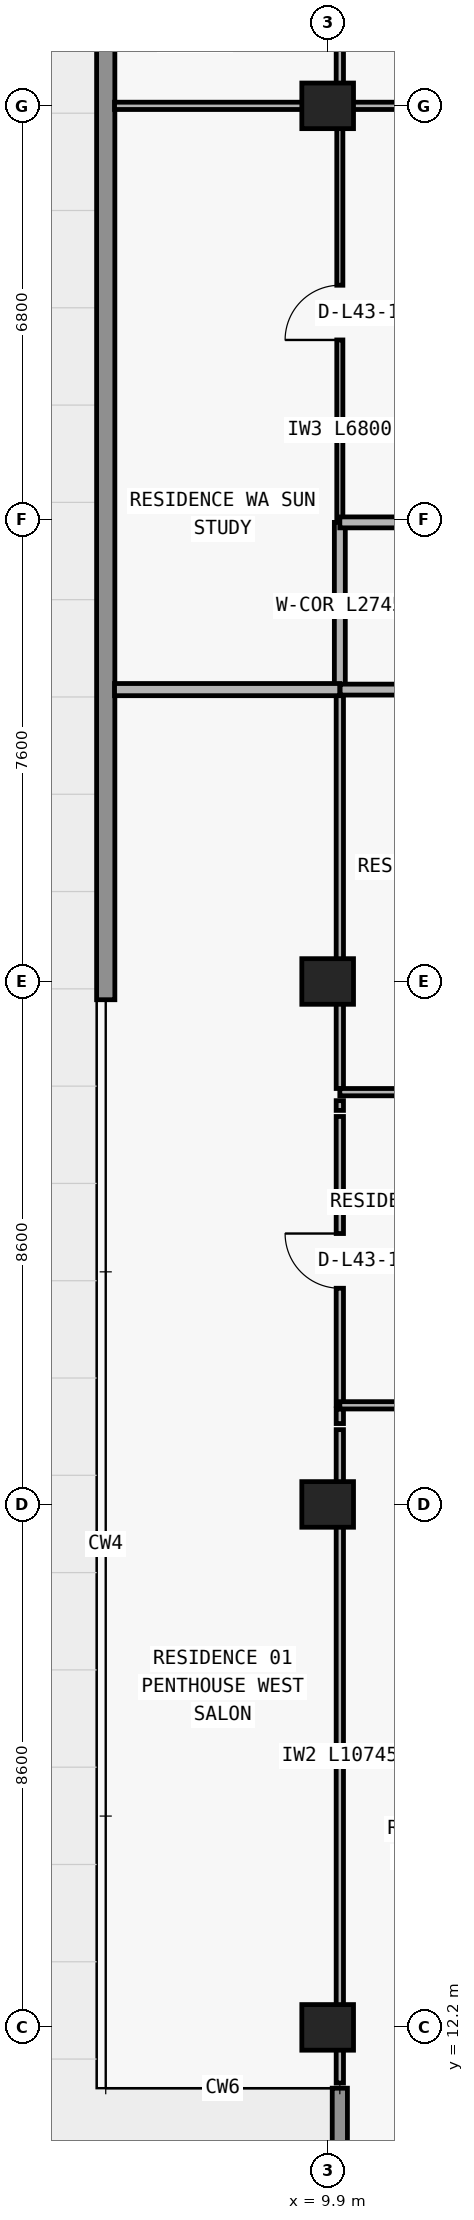
"""IFC4 building model, lengths in metres.
Left out: names, types, materials, properties, quantities, classifications, styles, units other than length and angle.
Written with IfcOpenShell. Run it as: python <this file> out.ifc"""

import sys

from ifc_helpers import new_model, si_unit, direction, frame, frame_2d, origin, origin_2d, place, context, subcontext, project, spatial, rectangle, extrude, element, fill, save


model = new_model("IFC4")
c1 = context("Model", 3, precision=1e-05, world=origin(), true_north=direction((0.0, 1.0)))
c2 = subcontext(c1, "Body", "Model", "MODEL_VIEW")
j1 = project(units=[si_unit("LENGTHUNIT", "METRE"), si_unit("PLANEANGLEUNIT", "RADIAN")], contexts=[c1])
p1 = place(None, origin())
s1 = spatial("IfcSite", under=j1, at=p1, CompositionType="ELEMENT")
p2 = place(p1, origin())
s2 = spatial("IfcBuilding", under=s1, at=p2, CompositionType="ELEMENT")
p3 = place(p2, frame((0.0, 0.0, 157.2)))
s3 = spatial("IfcBuildingStorey", under=s2, at=p3, CompositionType="ELEMENT", Elevation=157.2)
for number, where, z_axis, x_axis in (
    (1, (9.9, 12.2, 0.0), (0.0, 0.0, 1.0), (1.0, 0.0, 0.0)),
    (2, (9.9, 20.8, 0.0), (0.0, 0.0, 1.0), (1.0, 0.0, 0.0)),
    (3, (9.9, 29.4, 0.0), (0.0, 0.0, 1.0), (1.0, 0.0, 0.0)),
    (4, (9.9, 43.8, 0.0), (0.0, 0.0, 1.0), (1.0, 0.0, 0.0)),
):
    element("IfcColumn", number, at=place(p3, frame(where, z_axis=z_axis, x_axis=x_axis)), inside=s3, PredefinedType="COLUMN", context=c2, shape_type="SweptSolid", body=[
        extrude(rectangle(XDim=0.85, YDim=0.75, at=origin_2d()), origin(), (0.0, 0.0, 1.0), 3.05),
    ])
p4 = place(p3, frame((10.1, 11.2, 0.0), z_axis=(0.0, 0.0, 1.0), x_axis=(0.0, -1.0, 0.0)))
e5 = element("IfcWall", 5, at=p4, inside=s3, PredefinedType="ELEMENTEDWALL", context=c2, shape_type="SweptSolid", body=[
    extrude(rectangle(XDim=3.45, YDim=0.25, at=frame_2d((1.725, 0.0))), origin(), (0.0, 0.0, 1.0), 3.05),
])
p5 = place(p3, frame((6.25, 29.1, 0.0), z_axis=(0.0, 0.0, 1.0), x_axis=(0.0, 1.0, 0.0)))
e6 = element("IfcWall", 6, at=p5, inside=s3, PredefinedType="STANDARD", context=c2, shape_type="SweptSolid", body=[
    extrude(rectangle(XDim=17.9, YDim=0.3, at=frame_2d((8.95, 0.0))), origin(), (0.0, 0.0, 1.0), 3.05),
])
p6 = place(p3, frame((10.1, 11.285, 0.0), z_axis=(0.0, 0.0, 1.0), x_axis=(0.0, 1.0, 0.0)))
e7 = element("IfcWall", 7, at=p6, inside=s3, PredefinedType="PARTITIONING", context=c2, shape_type="SweptSolid", body=[
    extrude(rectangle(XDim=10.745, YDim=0.12, at=frame_2d((5.373, 0.0))), origin(), (0.0, 0.0, 1.0), 2.263),
])
p7 = place(p3, frame((10.1, 22.13, 0.0), z_axis=(0.0, 0.0, 1.0), x_axis=(0.0, 1.0, 0.0)))
e8 = element("IfcWall", 8, at=p7, inside=s3, PredefinedType="PARTITIONING", context=c2, shape_type="SweptSolid", body=[
    extrude(rectangle(XDim=0.24, YDim=0.12, at=frame_2d((0.12, 0.0))), origin(), (0.0, 0.0, 1.0), 2.263),
])
p8 = place(p3, frame((10.1, 22.43, 0.0), z_axis=(0.0, 0.0, 1.0), x_axis=(0.0, 1.0, 0.0)))
e9 = element("IfcWall", 9, at=p8, inside=s3, PredefinedType="PARTITIONING", context=c2, shape_type="SweptSolid", body=[
    extrude(rectangle(XDim=4.75, YDim=0.12, at=frame_2d((2.375, 0.0))), origin(), (0.0, 0.0, 1.0), 2.263),
])
p9 = place(p8, frame((1.925, 0.0, 0.0)))
e10 = element("IfcOpeningElement", 10, at=p9, cuts=e9, PredefinedType="OPENING", context=c2, shape_type="SweptSolid", body=[
    extrude(rectangle(XDim=0.9, YDim=2.15, at=frame_2d((0.45, 1.075))), frame((0.0, 0.07, 0.0), z_axis=(0.0, -1.0, 0.0), x_axis=(1.0, 0.0, 0.0)), (0.0, 0.0, 1.0), 0.14),
])
p10 = place(p3, frame((10.1, 27.28, 0.0), z_axis=(0.0, 0.0, 1.0), x_axis=(0.0, 1.0, 0.0)))
e11 = element("IfcWall", 11, at=p10, inside=s3, PredefinedType="PARTITIONING", context=c2, shape_type="SweptSolid", body=[
    extrude(rectangle(XDim=0.16, YDim=0.12, at=frame_2d((0.08, 0.0))), origin(), (0.0, 0.0, 1.0), 2.263),
])
p11 = place(p3, frame((10.1, 27.64, 0.0), z_axis=(0.0, 0.0, 1.0), x_axis=(0.0, 1.0, 0.0)))
e12 = element("IfcWall", 12, at=p11, inside=s3, PredefinedType="PARTITIONING", context=c2, shape_type="SweptSolid", body=[
    extrude(rectangle(XDim=6.56, YDim=0.12, at=frame_2d((3.28, 0.0))), origin(), (0.0, 0.0, 1.0), 2.263),
])
p12 = place(p3, frame((10.1, 34.205, 0.0), z_axis=(0.0, 0.0, 1.0), x_axis=(0.0, 1.0, 0.0)))
e13 = element("IfcWall", 13, at=p12, inside=s3, PredefinedType="PARTITIONING", context=c2, shape_type="SweptSolid", body=[
    extrude(rectangle(XDim=2.745, YDim=0.18, at=frame_2d((1.373, 0.0))), origin(), (0.0, 0.0, 1.0), 2.263),
])
p13 = place(p3, frame((10.1, 37.0, 0.0), z_axis=(0.0, 0.0, 1.0), x_axis=(0.0, 1.0, 0.0)))
e14 = element("IfcWall", 14, at=p13, inside=s3, PredefinedType="MOVABLE", context=c2, shape_type="SweptSolid", body=[
    extrude(rectangle(XDim=6.8, YDim=0.1, at=frame_2d((3.4, 0.0))), origin(), (0.0, 0.0, 1.0), 2.263),
])
p14 = place(p13, frame((2.95, 0.0, 0.0)))
e15 = element("IfcOpeningElement", 15, at=p14, cuts=e14, PredefinedType="OPENING", context=c2, shape_type="SweptSolid", body=[
    extrude(rectangle(XDim=0.9, YDim=2.15, at=frame_2d((0.45, 1.075))), frame((0.0, 0.06, 0.0), z_axis=(0.0, -1.0, 0.0), x_axis=(1.0, 0.0, 0.0)), (0.0, 0.0, 1.0), 0.12),
])
p15 = place(p3, frame((10.1, 43.805, 0.0), z_axis=(0.0, 0.0, 1.0), x_axis=(0.0, 1.0, 0.0)))
e16 = element("IfcWall", 16, at=p15, inside=s3, PredefinedType="PARTITIONING", context=c2, shape_type="SweptSolid", body=[
    extrude(rectangle(XDim=3.075, YDim=0.12, at=frame_2d((1.538, 0.0))), origin(), (0.0, 0.0, 1.0), 3.05),
])
p16 = place(p15, frame((1.087, 0.0, 0.0)))
e17 = element("IfcOpeningElement", 17, at=p16, cuts=e16, PredefinedType="OPENING", context=c2, shape_type="SweptSolid", body=[
    extrude(rectangle(XDim=0.9, YDim=2.15, at=frame_2d((0.45, 1.075))), frame((0.0, 0.07, 0.0), z_axis=(0.0, -1.0, 0.0), x_axis=(1.0, 0.0, 0.0)), (0.0, 0.0, 1.0), 0.14),
])
p17 = place(p3, frame((10.1, 22.43, 0.0), z_axis=(0.0, 0.0, 1.0), x_axis=(1.0, 0.0, 0.0)))
e18 = element("IfcWall", 18, at=p17, inside=s3, PredefinedType="PARTITIONING", context=c2, shape_type="SweptSolid", body=[
    extrude(rectangle(XDim=8.15, YDim=0.12, at=frame_2d((4.075, 0.0))), origin(), (0.0, 0.0, 1.0), 3.05),
])
p18 = place(p17, frame((1.477, 0.0, 0.0)))
e19 = element("IfcOpeningElement", 19, at=p18, cuts=e18, PredefinedType="OPENING", context=c2, shape_type="SweptSolid", body=[
    extrude(rectangle(XDim=0.9, YDim=2.15, at=frame_2d((0.45, 1.075))), frame((0.0, 0.07, 0.0), z_axis=(0.0, -1.0, 0.0), x_axis=(1.0, 0.0, 0.0)), (0.0, 0.0, 1.0), 0.14),
])
p19 = place(p17, frame((5.839, 0.0, 0.0)))
e20 = element("IfcOpeningElement", 20, at=p19, cuts=e18, PredefinedType="OPENING", context=c2, shape_type="SweptSolid", body=[
    extrude(rectangle(XDim=0.9, YDim=2.15, at=frame_2d((0.45, 1.075))), frame((0.0, 0.07, 0.0), z_axis=(0.0, -1.0, 0.0), x_axis=(1.0, 0.0, 0.0)), (0.0, 0.0, 1.0), 0.14),
])
p20 = place(p3, frame((10.1, 27.58, 0.0), z_axis=(0.0, 0.0, 1.0), x_axis=(1.0, 0.0, 0.0)))
e21 = element("IfcWall", 21, at=p20, inside=s3, PredefinedType="PARTITIONING", context=c2, shape_type="SweptSolid", body=[
    extrude(rectangle(XDim=8.15, YDim=0.12, at=frame_2d((4.075, 0.0))), origin(), (0.0, 0.0, 1.0), 3.05),
])
p21 = place(p20, frame((1.764, 0.0, 0.0)))
e22 = element("IfcOpeningElement", 22, at=p21, cuts=e21, PredefinedType="OPENING", context=c2, shape_type="SweptSolid", body=[
    extrude(rectangle(XDim=0.9, YDim=2.15, at=frame_2d((0.45, 1.075))), frame((0.0, 0.07, 0.0), z_axis=(0.0, -1.0, 0.0), x_axis=(1.0, 0.0, 0.0)), (0.0, 0.0, 1.0), 0.14),
])
p22 = place(p3, frame((6.395, 34.2, 0.0), z_axis=(0.0, 0.0, 1.0), x_axis=(1.0, 0.0, 0.0)))
e23 = element("IfcWall", 23, at=p22, inside=s3, PredefinedType="PARTITIONING", context=c2, shape_type="SweptSolid", body=[
    extrude(rectangle(XDim=3.705, YDim=0.2, at=frame_2d((1.853, 0.0))), origin(), (0.0, 0.0, 1.0), 3.05),
])
p23 = place(p3, frame((10.105, 34.2, 0.0), z_axis=(0.0, 0.0, 1.0), x_axis=(1.0, 0.0, 0.0)))
e24 = element("IfcWall", 24, at=p23, inside=s3, PredefinedType="PARTITIONING", context=c2, shape_type="SweptSolid", body=[
    extrude(rectangle(XDim=8.145, YDim=0.18, at=frame_2d((4.073, 0.0))), origin(), (0.0, 0.0, 1.0), 3.05),
])
p24 = place(p23, frame((2.772, 0.0, 0.0)))
e25 = element("IfcOpeningElement", 25, at=p24, cuts=e24, PredefinedType="OPENING", context=c2, shape_type="SweptSolid", body=[
    extrude(rectangle(XDim=1.0, YDim=2.2, at=frame_2d((0.5, 1.1))), frame((0.0, 0.1, 0.0), z_axis=(0.0, -1.0, 0.0), x_axis=(1.0, 0.0, 0.0)), (0.0, 0.0, 1.0), 0.2),
])
p25 = place(p3, frame((10.1, 36.95, 0.0), z_axis=(0.0, 0.0, 1.0), x_axis=(1.0, 0.0, 0.0)))
e26 = element("IfcWall", 26, at=p25, inside=s3, PredefinedType="PARTITIONING", context=c2, shape_type="SweptSolid", body=[
    extrude(rectangle(XDim=7.845, YDim=0.18, at=frame_2d((3.922, 0.0))), origin(), (0.0, 0.0, 1.0), 3.05),
])
p26 = place(p25, frame((3.46, 0.0, 0.0)))
e27 = element("IfcOpeningElement", 27, at=p26, cuts=e26, PredefinedType="OPENING", context=c2, shape_type="SweptSolid", body=[
    extrude(rectangle(XDim=1.0, YDim=2.2, at=frame_2d((0.5, 1.1))), frame((0.0, 0.1, 0.0), z_axis=(0.0, -1.0, 0.0), x_axis=(1.0, 0.0, 0.0)), (0.0, 0.0, 1.0), 0.2),
])
p27 = place(p3, frame((6.395, 43.8, 0.0), z_axis=(0.0, 0.0, 1.0), x_axis=(1.0, 0.0, 0.0)))
e28 = element("IfcWall", 28, at=p27, inside=s3, PredefinedType="PARTITIONING", context=c2, shape_type="SweptSolid", body=[
    extrude(rectangle(XDim=11.56, YDim=0.12, at=frame_2d((5.78, 0.0))), origin(), (0.0, 0.0, 1.0), 2.418),
])
p28 = place(p27, frame((7.215, 0.0, 0.0)))
e29 = element("IfcOpeningElement", 29, at=p28, cuts=e28, PredefinedType="OPENING", context=c2, shape_type="SweptSolid", body=[
    extrude(rectangle(XDim=0.9, YDim=2.15, at=frame_2d((0.45, 1.075))), frame((0.0, 0.07, 0.0), z_axis=(0.0, -1.0, 0.0), x_axis=(1.0, 0.0, 0.0)), (0.0, 0.0, 1.0), 0.14),
])
p29 = place(p27, frame((9.958, 0.0, 0.0)))
e30 = element("IfcOpeningElement", 30, at=p29, cuts=e28, PredefinedType="OPENING", context=c2, shape_type="SweptSolid", body=[
    extrude(rectangle(XDim=0.85, YDim=2.1, at=frame_2d((0.425, 1.05))), frame((0.0, 0.07, 0.0), z_axis=(0.0, -1.0, 0.0), x_axis=(1.0, 0.0, 0.0)), (0.0, 0.0, 1.0), 0.14),
])
p30 = place(p9, origin())
e31 = element("IfcDoor", 31, at=p30, inside=s3, OperationType="SINGLE_SWING_RIGHT", PredefinedType="DOOR", context=c2, shape_type="SweptSolid", body=[
    extrude(rectangle(XDim=0.9, YDim=2.15, at=frame_2d((0.45, 1.075))), frame((0.0, 0.025, 0.0), z_axis=(0.0, -1.0, 0.0), x_axis=(1.0, 0.0, 0.0)), (0.0, 0.0, 1.0), 0.05),
])
fill(e10, e31)
p31 = place(p14, origin())
e32 = element("IfcDoor", 32, at=p31, inside=s3, OperationType="SINGLE_SWING_LEFT", PredefinedType="DOOR", context=c2, shape_type="SweptSolid", body=[
    extrude(rectangle(XDim=0.9, YDim=2.15, at=frame_2d((0.45, 1.075))), frame((0.0, 0.025, 0.0), z_axis=(0.0, -1.0, 0.0), x_axis=(1.0, 0.0, 0.0)), (0.0, 0.0, 1.0), 0.05),
])
fill(e15, e32)
save(model, sys.argv[1])
